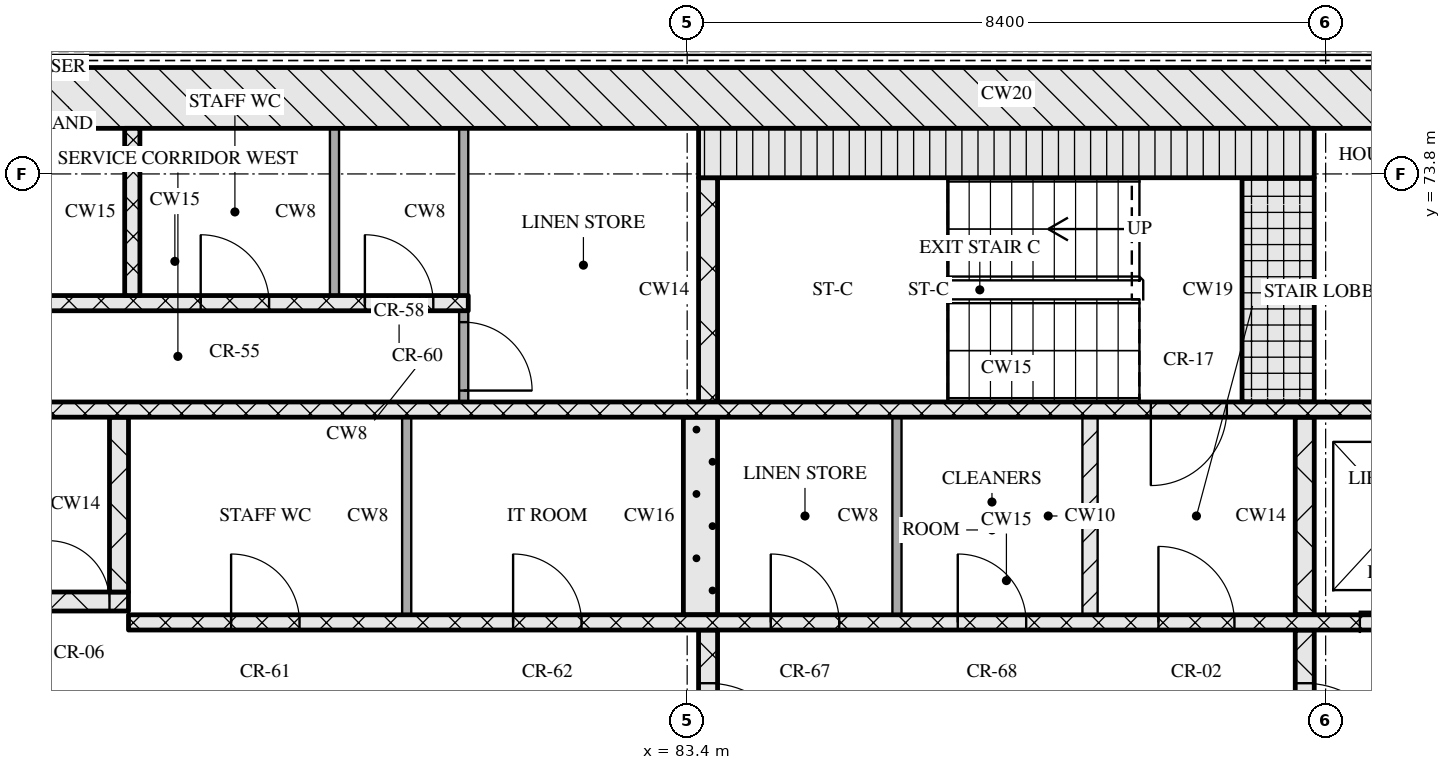
"""IFC4 building model, lengths in metres.
Left out: names, types, materials, properties, quantities, classifications, styles, units other than length and angle.
Written with IfcOpenShell. Run it as: python <this file> out.ifc"""

import sys

from ifc_helpers import new_model, si_unit, direction, frame, frame_2d, origin, place, context, subcontext, project, spatial, rectangle, extrude, element, fill, save


model = new_model("IFC4")
c1 = context("Model", 3, precision=1e-05, world=origin(), true_north=direction((0.0, 1.0)))
c2 = subcontext(c1, "Body", "Model", "MODEL_VIEW")
j1 = project(units=[si_unit("LENGTHUNIT", "METRE"), si_unit("PLANEANGLEUNIT", "RADIAN")], contexts=[c1])
p1 = place(None, origin())
s1 = spatial("IfcSite", under=j1, at=p1, CompositionType="ELEMENT")
p2 = place(p1, origin())
s2 = spatial("IfcBuilding", under=s1, at=p2, CompositionType="ELEMENT")
p3 = place(p2, frame((0.0, 0.0, 172.65)))
s3 = spatial("IfcBuildingStorey", under=s2, at=p3, CompositionType="ELEMENT", Elevation=172.65)
p4 = place(p3, frame((67.0, 74.8, 0.0), z_axis=(0.0, 0.0, 1.0), x_axis=(1.0, 0.0, 0.0)))
e1 = element("IfcWall", 1, at=p4, inside=s3, PredefinedType="SOLIDWALL", context=c2, shape_type="SweptSolid", body=[
    extrude(rectangle(XDim=41.2, YDim=0.8, at=frame_2d((20.6, 0.0))), origin(), (0.0, 0.0, 1.0), 3.32),
])
p5 = place(p3, frame((83.675, 65.2, 0.0), z_axis=(0.0, 0.0, 1.0), x_axis=(0.0, 1.0, 0.0)))
e2 = element("IfcWall", 2, at=p5, inside=s3, PredefinedType="SOLIDWALL", context=c2, shape_type="SweptSolid", body=[
    extrude(rectangle(XDim=2.6, YDim=0.25, at=frame_2d((1.3, 0.0))), origin(), (0.0, 0.0, 1.0), 3.32),
])
p6 = place(p5, frame((0.7, 0.0, 0.0)))
e3 = element("IfcOpeningElement", 3, at=p6, cuts=e2, PredefinedType="OPENING", context=c2, shape_type="SweptSolid", body=[
    extrude(rectangle(XDim=1.2, YDim=2.1, at=frame_2d((0.6, 1.05))), frame((0.0, 0.135, 0.0), z_axis=(0.0, -1.0, 0.0), x_axis=(1.0, 0.0, 0.0)), (0.0, 0.0, 1.0), 0.27),
])
p7 = place(p3, frame((91.525, 65.2, 0.0), z_axis=(0.0, 0.0, 1.0), x_axis=(0.0, 1.0, 0.0)))
e4 = element("IfcWall", 4, at=p7, inside=s3, PredefinedType="SOLIDWALL", context=c2, shape_type="SweptSolid", body=[
    extrude(rectangle(XDim=2.6, YDim=0.25, at=frame_2d((1.3, 0.0))), origin(), (0.0, 0.0, 1.0), 3.32),
])
p8 = place(p7, frame((0.7, 0.0, 0.0)))
e5 = element("IfcOpeningElement", 5, at=p8, cuts=e4, PredefinedType="OPENING", context=c2, shape_type="SweptSolid", body=[
    extrude(rectangle(XDim=1.2, YDim=2.1, at=frame_2d((0.6, 1.05))), frame((0.0, 0.135, 0.0), z_axis=(0.0, -1.0, 0.0), x_axis=(1.0, 0.0, 0.0)), (0.0, 0.0, 1.0), 0.27),
])
p9 = place(p3, frame((76.05, 67.9, 0.0), z_axis=(0.0, 0.0, 1.0), x_axis=(1.0, 0.0, 0.0)))
e6 = element("IfcWall", 6, at=p9, inside=s3, PredefinedType="SOLIDWALL", context=c2, shape_type="SweptSolid", body=[
    extrude(rectangle(XDim=23.1, YDim=0.2, at=frame_2d((11.55, 0.0))), origin(), (0.0, 0.0, 1.0), 3.32),
])
p10 = place(p9, frame((1.35, 0.0, 0.0)))
e7 = element("IfcOpeningElement", 7, at=p10, cuts=e6, PredefinedType="OPENING", context=c2, shape_type="SweptSolid", body=[
    extrude(rectangle(XDim=0.9, YDim=2.1, at=frame_2d((0.45, 1.05))), frame((0.0, 0.11, 0.0), z_axis=(0.0, -1.0, 0.0), x_axis=(1.0, 0.0, 0.0)), (0.0, 0.0, 1.0), 0.22),
])
p11 = place(p9, frame((5.06, 0.0, 0.0)))
e8 = element("IfcOpeningElement", 8, at=p11, cuts=e6, PredefinedType="OPENING", context=c2, shape_type="SweptSolid", body=[
    extrude(rectangle(XDim=0.9, YDim=2.1, at=frame_2d((0.45, 1.05))), frame((0.0, 0.11, 0.0), z_axis=(0.0, -1.0, 0.0), x_axis=(1.0, 0.0, 0.0)), (0.0, 0.0, 1.0), 0.22),
])
p12 = place(p9, frame((8.45, 0.0, 0.0)))
e9 = element("IfcOpeningElement", 9, at=p12, cuts=e6, PredefinedType="OPENING", context=c2, shape_type="SweptSolid", body=[
    extrude(rectangle(XDim=0.9, YDim=2.1, at=frame_2d((0.45, 1.05))), frame((0.0, 0.11, 0.0), z_axis=(0.0, -1.0, 0.0), x_axis=(1.0, 0.0, 0.0)), (0.0, 0.0, 1.0), 0.22),
])
p13 = place(p9, frame((10.91, 0.0, 0.0)))
e10 = element("IfcOpeningElement", 10, at=p13, cuts=e6, PredefinedType="OPENING", context=c2, shape_type="SweptSolid", body=[
    extrude(rectangle(XDim=0.9, YDim=2.1, at=frame_2d((0.45, 1.05))), frame((0.0, 0.11, 0.0), z_axis=(0.0, -1.0, 0.0), x_axis=(1.0, 0.0, 0.0)), (0.0, 0.0, 1.0), 0.22),
])
p14 = place(p9, frame((13.55, 0.0, 0.0)))
e11 = element("IfcOpeningElement", 11, at=p14, cuts=e6, PredefinedType="OPENING", context=c2, shape_type="SweptSolid", body=[
    extrude(rectangle(XDim=1.0, YDim=2.1, at=frame_2d((0.5, 1.05))), frame((0.0, 0.11, 0.0), z_axis=(0.0, -1.0, 0.0), x_axis=(1.0, 0.0, 0.0)), (0.0, 0.0, 1.0), 0.22),
])
p15 = place(p9, frame((16.2, 0.0, 0.0)))
e12 = element("IfcOpeningElement", 12, at=p15, cuts=e6, PredefinedType="OPENING", context=c2, shape_type="SweptSolid", body=[
    extrude(rectangle(XDim=1.1, YDim=2.1, at=frame_2d((0.55, 1.05))), frame((0.0, 0.11, 0.0), z_axis=(0.0, -1.0, 0.0), x_axis=(1.0, 0.0, 0.0)), (0.0, 0.0, 1.0), 0.22),
])
p16 = place(p9, frame((18.7, 0.0, 0.0)))
e13 = element("IfcOpeningElement", 13, at=p16, cuts=e6, PredefinedType="OPENING", context=c2, shape_type="SweptSolid", body=[
    extrude(rectangle(XDim=1.1, YDim=2.1, at=frame_2d((0.55, 1.05))), frame((0.0, 0.11, 0.0), z_axis=(0.0, -1.0, 0.0), x_axis=(1.0, 0.0, 0.0)), (0.0, 0.0, 1.0), 0.22),
])
p17 = place(p9, frame((21.2, 0.0, 0.0)))
e14 = element("IfcOpeningElement", 14, at=p17, cuts=e6, PredefinedType="OPENING", context=c2, shape_type="SweptSolid", body=[
    extrude(rectangle(XDim=1.1, YDim=2.1, at=frame_2d((0.55, 1.05))), frame((0.0, 0.11, 0.0), z_axis=(0.0, -1.0, 0.0), x_axis=(1.0, 0.0, 0.0)), (0.0, 0.0, 1.0), 0.22),
])
p18 = place(p3, frame((79.71, 68.0, 0.0), z_axis=(0.0, 0.0, 1.0), x_axis=(0.0, 1.0, 0.0)))
e15 = element("IfcWall", 15, at=p18, inside=s3, PredefinedType="PARTITIONING", context=c2, shape_type="SweptSolid", body=[
    extrude(rectangle(XDim=2.6, YDim=0.12, at=frame_2d((1.3, 0.0))), origin(), (0.0, 0.0, 1.0), 3.32),
])
p19 = place(p3, frame((83.575, 68.0, 0.0), z_axis=(0.0, 0.0, 1.0), x_axis=(0.0, 1.0, 0.0)))
e16 = element("IfcWall", 16, at=p19, inside=s3, PredefinedType="SOLIDWALL", context=c2, shape_type="SweptSolid", body=[
    extrude(rectangle(XDim=2.6, YDim=0.45, at=frame_2d((1.3, 0.0))), origin(), (0.0, 0.0, 1.0), 3.32),
])
p20 = place(p3, frame((86.16, 68.0, 0.0), z_axis=(0.0, 0.0, 1.0), x_axis=(0.0, 1.0, 0.0)))
e17 = element("IfcWall", 17, at=p20, inside=s3, PredefinedType="PARTITIONING", context=c2, shape_type="SweptSolid", body=[
    extrude(rectangle(XDim=2.6, YDim=0.12, at=frame_2d((1.3, 0.0))), origin(), (0.0, 0.0, 1.0), 3.32),
])
p21 = place(p3, frame((88.7, 68.0, 0.0), z_axis=(0.0, 0.0, 1.0), x_axis=(0.0, 1.0, 0.0)))
e18 = element("IfcWall", 18, at=p21, inside=s3, PredefinedType="PARTITIONING", context=c2, shape_type="SweptSolid", body=[
    extrude(rectangle(XDim=2.6, YDim=0.2, at=frame_2d((1.3, 0.0))), origin(), (0.0, 0.0, 1.0), 3.32),
])
p22 = place(p3, frame((91.525, 68.0, 0.0), z_axis=(0.0, 0.0, 1.0), x_axis=(0.0, 1.0, 0.0)))
e19 = element("IfcWall", 19, at=p22, inside=s3, PredefinedType="SOLIDWALL", context=c2, shape_type="SweptSolid", body=[
    extrude(rectangle(XDim=2.6, YDim=0.25, at=frame_2d((1.3, 0.0))), origin(), (0.0, 0.0, 1.0), 3.32),
])
p23 = place(p3, frame((67.8, 68.175, 0.0), z_axis=(0.0, 0.0, 1.0), x_axis=(1.0, 0.0, 0.0)))
e20 = element("IfcWall", 20, at=p23, inside=s3, PredefinedType="SOLIDWALL", context=c2, shape_type="SweptSolid", body=[
    extrude(rectangle(XDim=8.25, YDim=0.25, at=frame_2d((4.125, 0.0))), origin(), (0.0, 0.0, 1.0), 3.32),
])
p24 = place(p23, frame((5.7, 0.0, 0.0)))
e21 = element("IfcOpeningElement", 21, at=p24, cuts=e20, PredefinedType="OPENING", context=c2, shape_type="SweptSolid", body=[
    extrude(rectangle(XDim=1.0, YDim=2.1, at=frame_2d((0.5, 1.05))), frame((0.0, 0.135, 0.0), z_axis=(0.0, -1.0, 0.0), x_axis=(1.0, 0.0, 0.0)), (0.0, 0.0, 1.0), 0.27),
])
p25 = place(p23, frame((7.2, 0.0, 0.0)))
e22 = element("IfcOpeningElement", 22, at=p25, cuts=e20, PredefinedType="OPENING", context=c2, shape_type="SweptSolid", body=[
    extrude(rectangle(XDim=0.8, YDim=2.1, at=frame_2d((0.4, 1.05))), frame((0.0, 0.135, 0.0), z_axis=(0.0, -1.0, 0.0), x_axis=(1.0, 0.0, 0.0)), (0.0, 0.0, 1.0), 0.27),
])
p26 = place(p3, frame((75.925, 68.3, 0.0), z_axis=(0.0, 0.0, 1.0), x_axis=(0.0, 1.0, 0.0)))
e23 = element("IfcWall", 23, at=p26, inside=s3, PredefinedType="SOLIDWALL", context=c2, shape_type="SweptSolid", body=[
    extrude(rectangle(XDim=2.3, YDim=0.25, at=frame_2d((1.15, 0.0))), origin(), (0.0, 0.0, 1.0), 3.32),
])
p27 = place(p3, frame((67.8, 70.7, 0.0), z_axis=(0.0, 0.0, 1.0), x_axis=(1.0, 0.0, 0.0)))
e24 = element("IfcWall", 24, at=p27, inside=s3, PredefinedType="SOLIDWALL", context=c2, shape_type="SweptSolid", body=[
    extrude(rectangle(XDim=39.6, YDim=0.2, at=frame_2d((19.8, 0.0))), origin(), (0.0, 0.0, 1.0), 3.32),
])
p28 = place(p27, frame((0.65, 0.0, 0.0)))
e25 = element("IfcOpeningElement", 25, at=p28, cuts=e24, PredefinedType="OPENING", context=c2, shape_type="SweptSolid", body=[
    extrude(rectangle(XDim=1.1, YDim=2.1, at=frame_2d((0.55, 1.05))), frame((0.0, 0.11, 0.0), z_axis=(0.0, -1.0, 0.0), x_axis=(1.0, 0.0, 0.0)), (0.0, 0.0, 1.0), 0.22),
])
p29 = place(p27, frame((3.25, 0.0, 0.0)))
e26 = element("IfcOpeningElement", 26, at=p29, cuts=e24, PredefinedType="OPENING", context=c2, shape_type="SweptSolid", body=[
    extrude(rectangle(XDim=1.1, YDim=2.1, at=frame_2d((0.55, 1.05))), frame((0.0, 0.11, 0.0), z_axis=(0.0, -1.0, 0.0), x_axis=(1.0, 0.0, 0.0)), (0.0, 0.0, 1.0), 0.22),
])
p30 = place(p27, frame((5.9, 0.0, 0.0)))
e27 = element("IfcOpeningElement", 27, at=p30, cuts=e24, PredefinedType="OPENING", context=c2, shape_type="SweptSolid", body=[
    extrude(rectangle(XDim=1.0, YDim=2.1, at=frame_2d((0.5, 1.05))), frame((0.0, 0.11, 0.0), z_axis=(0.0, -1.0, 0.0), x_axis=(1.0, 0.0, 0.0)), (0.0, 0.0, 1.0), 0.22),
])
p31 = place(p27, frame((21.7, 0.0, 0.0)))
e28 = element("IfcOpeningElement", 28, at=p31, cuts=e24, PredefinedType="OPENING", context=c2, shape_type="SweptSolid", body=[
    extrude(rectangle(XDim=1.0, YDim=2.1, at=frame_2d((0.5, 1.05))), frame((0.0, 0.11, 0.0), z_axis=(0.0, -1.0, 0.0), x_axis=(1.0, 0.0, 0.0)), (0.0, 0.0, 1.0), 0.22),
])
p32 = place(p27, frame((32.7, 0.0, 0.0)))
e29 = element("IfcOpeningElement", 29, at=p32, cuts=e24, PredefinedType="OPENING", context=c2, shape_type="SweptSolid", body=[
    extrude(rectangle(XDim=1.0, YDim=2.1, at=frame_2d((0.5, 1.05))), frame((0.0, 0.11, 0.0), z_axis=(0.0, -1.0, 0.0), x_axis=(1.0, 0.0, 0.0)), (0.0, 0.0, 1.0), 0.22),
])
p33 = place(p27, frame((35.25, 0.0, 0.0)))
e30 = element("IfcOpeningElement", 30, at=p33, cuts=e24, PredefinedType="OPENING", context=c2, shape_type="SweptSolid", body=[
    extrude(rectangle(XDim=1.1, YDim=2.1, at=frame_2d((0.55, 1.05))), frame((0.0, 0.11, 0.0), z_axis=(0.0, -1.0, 0.0), x_axis=(1.0, 0.0, 0.0)), (0.0, 0.0, 1.0), 0.22),
])
p34 = place(p27, frame((37.85, 0.0, 0.0)))
e31 = element("IfcOpeningElement", 31, at=p34, cuts=e24, PredefinedType="OPENING", context=c2, shape_type="SweptSolid", body=[
    extrude(rectangle(XDim=1.1, YDim=2.1, at=frame_2d((0.55, 1.05))), frame((0.0, 0.11, 0.0), z_axis=(0.0, -1.0, 0.0), x_axis=(1.0, 0.0, 0.0)), (0.0, 0.0, 1.0), 0.22),
])
p35 = place(p3, frame((80.46, 70.8, 0.0), z_axis=(0.0, 0.0, 1.0), x_axis=(0.0, 1.0, 0.0)))
e32 = element("IfcWall", 32, at=p35, inside=s3, PredefinedType="PARTITIONING", context=c2, shape_type="SweptSolid", body=[
    extrude(rectangle(XDim=1.2, YDim=0.12, at=frame_2d((0.6, 0.0))), origin(), (0.0, 0.0, 1.0), 3.32),
])
p36 = place(p35, frame((0.15, 0.0, 0.0)))
e33 = element("IfcOpeningElement", 33, at=p36, cuts=e32, PredefinedType="OPENING", context=c2, shape_type="SweptSolid", body=[
    extrude(rectangle(XDim=0.9, YDim=2.1, at=frame_2d((0.45, 1.05))), frame((0.0, 0.07, 0.0), z_axis=(0.0, -1.0, 0.0), x_axis=(1.0, 0.0, 0.0)), (0.0, 0.0, 1.0), 0.14),
])
p37 = place(p3, frame((83.675, 70.8, 0.0), z_axis=(0.0, 0.0, 1.0), x_axis=(0.0, 1.0, 0.0)))
e34 = element("IfcWall", 34, at=p37, inside=s3, PredefinedType="SOLIDWALL", context=c2, shape_type="SweptSolid", body=[
    extrude(rectangle(XDim=2.95, YDim=0.25, at=frame_2d((1.475, 0.0))), origin(), (0.0, 0.0, 1.0), 3.32),
])
p38 = place(p3, frame((91.175, 70.8, 0.0), z_axis=(0.0, 0.0, 1.0), x_axis=(0.0, 1.0, 0.0)))
e35 = element("IfcWall", 35, at=p38, inside=s3, PredefinedType="SOLIDWALL", context=c2, shape_type="SweptSolid", body=[
    extrude(rectangle(XDim=2.95, YDim=0.95, at=frame_2d((1.475, 0.0))), origin(), (0.0, 0.0, 1.0), 3.32),
])
p39 = place(p3, frame((72.8, 72.1, 0.0), z_axis=(0.0, 0.0, 1.0), x_axis=(1.0, 0.0, 0.0)))
e36 = element("IfcWall", 36, at=p39, inside=s3, PredefinedType="SOLIDWALL", context=c2, shape_type="SweptSolid", body=[
    extrude(rectangle(XDim=7.72, YDim=0.2, at=frame_2d((3.86, 0.0))), origin(), (0.0, 0.0, 1.0), 3.32),
])
p40 = place(p39, frame((1.25, 0.0, 0.0)))
e37 = element("IfcOpeningElement", 37, at=p40, cuts=e36, PredefinedType="OPENING", context=c2, shape_type="SweptSolid", body=[
    extrude(rectangle(XDim=0.9, YDim=2.1, at=frame_2d((0.45, 1.05))), frame((0.0, 0.11, 0.0), z_axis=(0.0, -1.0, 0.0), x_axis=(1.0, 0.0, 0.0)), (0.0, 0.0, 1.0), 0.22),
])
p41 = place(p39, frame((4.2, 0.0, 0.0)))
e38 = element("IfcOpeningElement", 38, at=p41, cuts=e36, PredefinedType="OPENING", context=c2, shape_type="SweptSolid", body=[
    extrude(rectangle(XDim=0.9, YDim=2.1, at=frame_2d((0.45, 1.05))), frame((0.0, 0.11, 0.0), z_axis=(0.0, -1.0, 0.0), x_axis=(1.0, 0.0, 0.0)), (0.0, 0.0, 1.0), 0.22),
])
p42 = place(p39, frame((6.36, 0.0, 0.0)))
e39 = element("IfcOpeningElement", 39, at=p42, cuts=e36, PredefinedType="OPENING", context=c2, shape_type="SweptSolid", body=[
    extrude(rectangle(XDim=0.9, YDim=2.1, at=frame_2d((0.45, 1.05))), frame((0.0, 0.11, 0.0), z_axis=(0.0, -1.0, 0.0), x_axis=(1.0, 0.0, 0.0)), (0.0, 0.0, 1.0), 0.22),
])
p43 = place(p3, frame((76.1, 72.2, 0.0), z_axis=(0.0, 0.0, 1.0), x_axis=(0.0, 1.0, 0.0)))
e40 = element("IfcWall", 40, at=p43, inside=s3, PredefinedType="SOLIDWALL", context=c2, shape_type="SweptSolid", body=[
    extrude(rectangle(XDim=2.2, YDim=0.2, at=frame_2d((1.1, 0.0))), origin(), (0.0, 0.0, 1.0), 3.32),
])
for number, where, z_axis, x_axis in (
    (41, (78.76, 72.2, 0.0), (0.0, 0.0, 1.0), (0.0, 1.0, 0.0)),
    (42, (80.46, 72.2, 0.0), (0.0, 0.0, 1.0), (0.0, 1.0, 0.0)),
):
    element("IfcWall", number, at=place(p3, frame(where, z_axis=z_axis, x_axis=x_axis)), inside=s3, PredefinedType="PARTITIONING", context=c2, shape_type="SweptSolid", body=[
        extrude(rectangle(XDim=2.2, YDim=0.12, at=frame_2d((1.1, 0.0))), origin(), (0.0, 0.0, 1.0), 3.32),
    ])
p44 = place(p3, frame((83.55, 74.075, 0.0), z_axis=(0.0, 0.0, 1.0), x_axis=(1.0, 0.0, 0.0)))
e43 = element("IfcWall", 43, at=p44, inside=s3, PredefinedType="SOLIDWALL", context=c2, shape_type="SweptSolid", body=[
    extrude(rectangle(XDim=8.1, YDim=0.65, at=frame_2d((4.05, 0.0))), origin(), (0.0, 0.0, 1.0), 3.32),
])
p45 = place(p6, origin())
e44 = element("IfcDoor", 44, at=p45, inside=s3, OperationType="SINGLE_SWING_RIGHT", PredefinedType="DOOR", context=c2, shape_type="SweptSolid", body=[
    extrude(rectangle(XDim=1.2, YDim=2.1, at=frame_2d((0.6, 1.05))), frame((0.0, 0.025, 0.0), z_axis=(0.0, -1.0, 0.0), x_axis=(1.0, 0.0, 0.0)), (0.0, 0.0, 1.0), 0.05),
])
fill(e3, e44)
p46 = place(p8, origin())
e45 = element("IfcDoor", 45, at=p46, inside=s3, OperationType="SINGLE_SWING_RIGHT", PredefinedType="DOOR", context=c2, shape_type="SweptSolid", body=[
    extrude(rectangle(XDim=1.2, YDim=2.1, at=frame_2d((0.6, 1.05))), frame((0.0, 0.025, 0.0), z_axis=(0.0, -1.0, 0.0), x_axis=(1.0, 0.0, 0.0)), (0.0, 0.0, 1.0), 0.05),
])
fill(e5, e45)
p47 = place(p10, origin())
e46 = element("IfcDoor", 46, at=p47, inside=s3, OperationType="SINGLE_SWING_LEFT", PredefinedType="DOOR", context=c2, shape_type="SweptSolid", body=[
    extrude(rectangle(XDim=0.9, YDim=2.1, at=frame_2d((0.45, 1.05))), frame((0.0, 0.025, 0.0), z_axis=(0.0, -1.0, 0.0), x_axis=(1.0, 0.0, 0.0)), (0.0, 0.0, 1.0), 0.05),
])
fill(e7, e46)
p48 = place(p11, origin())
e47 = element("IfcDoor", 47, at=p48, inside=s3, OperationType="SINGLE_SWING_LEFT", PredefinedType="DOOR", context=c2, shape_type="SweptSolid", body=[
    extrude(rectangle(XDim=0.9, YDim=2.1, at=frame_2d((0.45, 1.05))), frame((0.0, 0.025, 0.0), z_axis=(0.0, -1.0, 0.0), x_axis=(1.0, 0.0, 0.0)), (0.0, 0.0, 1.0), 0.05),
])
fill(e8, e47)
p49 = place(p12, origin())
e48 = element("IfcDoor", 48, at=p49, inside=s3, OperationType="SINGLE_SWING_LEFT", PredefinedType="DOOR", context=c2, shape_type="SweptSolid", body=[
    extrude(rectangle(XDim=0.9, YDim=2.1, at=frame_2d((0.45, 1.05))), frame((0.0, 0.025, 0.0), z_axis=(0.0, -1.0, 0.0), x_axis=(1.0, 0.0, 0.0)), (0.0, 0.0, 1.0), 0.05),
])
fill(e9, e48)
p50 = place(p13, origin())
e49 = element("IfcDoor", 49, at=p50, inside=s3, OperationType="SINGLE_SWING_LEFT", PredefinedType="DOOR", context=c2, shape_type="SweptSolid", body=[
    extrude(rectangle(XDim=0.9, YDim=2.1, at=frame_2d((0.45, 1.05))), frame((0.0, 0.025, 0.0), z_axis=(0.0, -1.0, 0.0), x_axis=(1.0, 0.0, 0.0)), (0.0, 0.0, 1.0), 0.05),
])
fill(e10, e49)
p51 = place(p14, origin())
e50 = element("IfcDoor", 50, at=p51, inside=s3, OperationType="SINGLE_SWING_LEFT", PredefinedType="DOOR", context=c2, shape_type="SweptSolid", body=[
    extrude(rectangle(XDim=1.0, YDim=2.1, at=frame_2d((0.5, 1.05))), frame((0.0, 0.025, 0.0), z_axis=(0.0, -1.0, 0.0), x_axis=(1.0, 0.0, 0.0)), (0.0, 0.0, 1.0), 0.05),
])
fill(e11, e50)
p52 = place(p15, origin())
e51 = element("IfcDoor", 51, at=p52, inside=s3, OperationType="SLIDING_TO_RIGHT", PredefinedType="DOOR", context=c2, shape_type="SweptSolid", body=[
    extrude(rectangle(XDim=1.1, YDim=2.1, at=frame_2d((0.55, 1.05))), frame((0.0, 0.025, 0.0), z_axis=(0.0, -1.0, 0.0), x_axis=(1.0, 0.0, 0.0)), (0.0, 0.0, 1.0), 0.05),
])
fill(e12, e51)
p53 = place(p25, origin())
e52 = element("IfcDoor", 52, at=p53, inside=s3, OperationType="SINGLE_SWING_LEFT", PredefinedType="DOOR", context=c2, shape_type="SweptSolid", body=[
    extrude(rectangle(XDim=0.8, YDim=2.1, at=frame_2d((0.4, 1.05))), frame((0.0, 0.025, 0.0), z_axis=(0.0, -1.0, 0.0), x_axis=(1.0, 0.0, 0.0)), (0.0, 0.0, 1.0), 0.05),
])
fill(e22, e52)
p54 = place(p31, origin())
e53 = element("IfcDoor", 53, at=p54, inside=s3, OperationType="SINGLE_SWING_RIGHT", PredefinedType="DOOR", context=c2, shape_type="SweptSolid", body=[
    extrude(rectangle(XDim=1.0, YDim=2.1, at=frame_2d((0.5, 1.05))), frame((0.0, 0.025, 0.0), z_axis=(0.0, -1.0, 0.0), x_axis=(1.0, 0.0, 0.0)), (0.0, 0.0, 1.0), 0.05),
])
fill(e28, e53)
p55 = place(p36, origin())
e54 = element("IfcDoor", 54, at=p55, inside=s3, OperationType="SINGLE_SWING_RIGHT", PredefinedType="DOOR", context=c2, shape_type="SweptSolid", body=[
    extrude(rectangle(XDim=0.9, YDim=2.1, at=frame_2d((0.45, 1.05))), frame((0.0, 0.025, 0.0), z_axis=(0.0, -1.0, 0.0), x_axis=(1.0, 0.0, 0.0)), (0.0, 0.0, 1.0), 0.05),
])
fill(e33, e54)
p56 = place(p41, origin())
e55 = element("IfcDoor", 55, at=p56, inside=s3, OperationType="SINGLE_SWING_LEFT", PredefinedType="DOOR", context=c2, shape_type="SweptSolid", body=[
    extrude(rectangle(XDim=0.9, YDim=2.1, at=frame_2d((0.45, 1.05))), frame((0.0, 0.025, 0.0), z_axis=(0.0, -1.0, 0.0), x_axis=(1.0, 0.0, 0.0)), (0.0, 0.0, 1.0), 0.05),
])
fill(e38, e55)
p57 = place(p42, origin())
e56 = element("IfcDoor", 56, at=p57, inside=s3, OperationType="SINGLE_SWING_LEFT", PredefinedType="DOOR", context=c2, shape_type="SweptSolid", body=[
    extrude(rectangle(XDim=0.9, YDim=2.1, at=frame_2d((0.45, 1.05))), frame((0.0, 0.025, 0.0), z_axis=(0.0, -1.0, 0.0), x_axis=(1.0, 0.0, 0.0)), (0.0, 0.0, 1.0), 0.05),
])
fill(e39, e56)
save(model, sys.argv[1])
